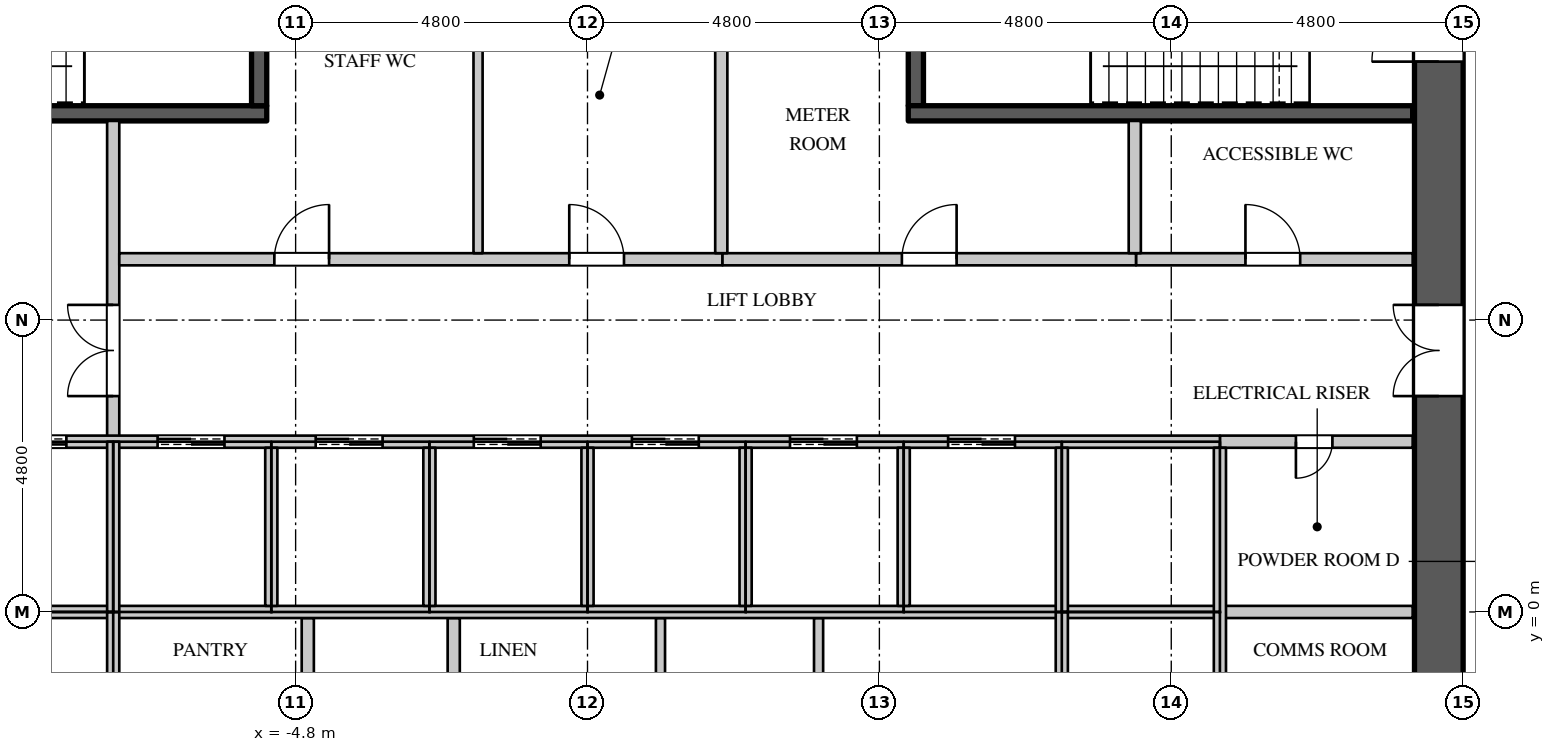
"""IFC4 building model, lengths in metres.
Left out: names, types, materials, properties, quantities, classifications, styles, units other than length and angle.
Written with IfcOpenShell. Run it as: python <this file> out.ifc"""

import sys

from ifc_helpers import new_model, si_unit, direction, frame, frame_2d, origin, place, context, subcontext, project, spatial, rectangle, extrude, element, fill, save


model = new_model("IFC4")
c1 = context("Model", 3, precision=1e-05, world=origin(), true_north=direction((0.0, 1.0)))
c2 = subcontext(c1, "Body", "Model", "MODEL_VIEW")
j1 = project(units=[si_unit("LENGTHUNIT", "METRE"), si_unit("PLANEANGLEUNIT", "RADIAN")], contexts=[c1])
p1 = place(None, origin())
s1 = spatial("IfcSite", under=j1, at=p1, CompositionType="ELEMENT")
p2 = place(p1, origin())
s2 = spatial("IfcBuilding", under=s1, at=p2, CompositionType="ELEMENT")
p3 = place(p2, frame((0.0, 0.0, 106.5)))
s3 = spatial("IfcBuildingStorey", under=s2, at=p3, CompositionType="ELEMENT", Elevation=106.5)
p4 = place(p3, frame((14.0, -11.2, 0.0), z_axis=(0.0, 0.0, 1.0), x_axis=(0.0, 1.0, 0.0)))
e1 = element("IfcWall", 1, at=p4, inside=s3, PredefinedType="SHEAR", context=c2, shape_type="SweptSolid", body=[
    extrude(rectangle(XDim=22.4, YDim=0.8, at=frame_2d((11.2, 0.0))), origin(), (0.0, 0.0, 1.0), 4.2),
])
p5 = place(p4, frame((20.25, 0.0, 0.0)))
e2 = element("IfcOpeningElement", 2, at=p5, cuts=e1, PredefinedType="OPENING", context=c2, shape_type="SweptSolid", body=[
    extrude(rectangle(XDim=1.1, YDim=2.2, at=frame_2d((0.55, 1.1))), frame((0.0, 0.41, 0.0), z_axis=(0.0, -1.0, 0.0), x_axis=(1.0, 0.0, 0.0)), (0.0, 0.0, 1.0), 0.82),
])
p6 = place(p4, frame((1.05, 0.0, 0.0)))
e3 = element("IfcOpeningElement", 3, at=p6, cuts=e1, PredefinedType="OPENING", context=c2, shape_type="SweptSolid", body=[
    extrude(rectangle(XDim=1.1, YDim=2.2, at=frame_2d((0.55, 1.1))), frame((0.0, 0.41, 0.0), z_axis=(0.0, -1.0, 0.0), x_axis=(1.0, 0.0, 0.0)), (0.0, 0.0, 1.0), 0.82),
])
p7 = place(p4, frame((14.75, 0.0, 0.0)))
e4 = element("IfcOpeningElement", 4, at=p7, cuts=e1, PredefinedType="OPENING", context=c2, shape_type="SweptSolid", body=[
    extrude(rectangle(XDim=1.5, YDim=2.4, at=frame_2d((0.75, 1.2))), frame((0.0, 0.41, 0.0), z_axis=(0.0, -1.0, 0.0), x_axis=(1.0, 0.0, 0.0)), (0.0, 0.0, 1.0), 0.82),
])
p8 = place(p4, frame((6.15, 0.0, 0.0)))
e5 = element("IfcOpeningElement", 5, at=p8, cuts=e1, PredefinedType="OPENING", context=c2, shape_type="SweptSolid", body=[
    extrude(rectangle(XDim=1.5, YDim=2.4, at=frame_2d((0.75, 1.2))), frame((0.0, 0.41, 0.0), z_axis=(0.0, -1.0, 0.0), x_axis=(1.0, 0.0, 0.0)), (0.0, 0.0, 1.0), 0.82),
])
p9 = place(p3, frame((-7.8, 2.8, 0.0), z_axis=(0.0, 0.0, 1.0), x_axis=(0.0, 1.0, 0.0)))
e6 = element("IfcWall", 6, at=p9, inside=s3, PredefinedType="PARTITIONING", context=c2, shape_type="SweptSolid", body=[
    extrude(rectangle(XDim=5.275, YDim=0.2, at=frame_2d((2.637, 0.0))), origin(), (0.0, 0.0, 1.0), 3.95),
])
p10 = place(p9, frame((0.75, 0.0, 0.0)))
e7 = element("IfcOpeningElement", 7, at=p10, cuts=e6, PredefinedType="OPENING", context=c2, shape_type="SweptSolid", body=[
    extrude(rectangle(XDim=1.5, YDim=2.4, at=frame_2d((0.75, 1.2))), frame((0.0, 0.11, 0.0), z_axis=(0.0, -1.0, 0.0), x_axis=(1.0, 0.0, 0.0)), (0.0, 0.0, 1.0), 0.22),
])
p11 = place(p3, frame((-7.7, 5.8, 0.0), z_axis=(0.0, 0.0, 1.0), x_axis=(1.0, 0.0, 0.0)))
e8 = element("IfcWall", 8, at=p11, inside=s3, PredefinedType="PARTITIONING", context=c2, shape_type="SweptSolid", body=[
    extrude(rectangle(XDim=9.92, YDim=0.2, at=frame_2d((4.96, 0.0))), origin(), (0.0, 0.0, 1.0), 3.95),
])
p12 = place(p11, frame((2.55, 0.0, 0.0)))
e9 = element("IfcOpeningElement", 9, at=p12, cuts=e8, PredefinedType="OPENING", context=c2, shape_type="SweptSolid", body=[
    extrude(rectangle(XDim=0.9, YDim=2.2, at=frame_2d((0.45, 1.1))), frame((0.0, 0.11, 0.0), z_axis=(0.0, -1.0, 0.0), x_axis=(1.0, 0.0, 0.0)), (0.0, 0.0, 1.0), 0.22),
])
p13 = place(p11, frame((7.4, 0.0, 0.0)))
e10 = element("IfcOpeningElement", 10, at=p13, cuts=e8, PredefinedType="OPENING", context=c2, shape_type="SweptSolid", body=[
    extrude(rectangle(XDim=0.9, YDim=2.2, at=frame_2d((0.45, 1.1))), frame((0.0, 0.11, 0.0), z_axis=(0.0, -1.0, 0.0), x_axis=(1.0, 0.0, 0.0)), (0.0, 0.0, 1.0), 0.22),
])
p14 = place(p3, frame((9.02, 5.8, 0.0), z_axis=(0.0, 0.0, 1.0), x_axis=(1.0, 0.0, 0.0)))
e11 = element("IfcWall", 11, at=p14, inside=s3, PredefinedType="PARTITIONING", context=c2, shape_type="SweptSolid", body=[
    extrude(rectangle(XDim=4.55, YDim=0.2, at=frame_2d((2.275, 0.0))), origin(), (0.0, 0.0, 1.0), 3.95),
])
p15 = place(p14, frame((1.8, 0.0, 0.0)))
e12 = element("IfcOpeningElement", 12, at=p15, cuts=e11, PredefinedType="OPENING", context=c2, shape_type="SweptSolid", body=[
    extrude(rectangle(XDim=0.9, YDim=2.2, at=frame_2d((0.45, 1.1))), frame((0.0, 0.11, 0.0), z_axis=(0.0, -1.0, 0.0), x_axis=(1.0, 0.0, 0.0)), (0.0, 0.0, 1.0), 0.22),
])
p16 = place(p3, frame((-1.8, 5.9, 0.0), z_axis=(0.0, 0.0, 1.0), x_axis=(0.0, 1.0, 0.0)))
e13 = element("IfcWall", 13, at=p16, inside=s3, PredefinedType="PARTITIONING", context=c2, shape_type="SweptSolid", body=[
    extrude(rectangle(XDim=5.27, YDim=0.15, at=frame_2d((2.635, 0.0))), origin(), (0.0, 0.0, 1.0), 3.95),
])
for number, where, z_axis, x_axis in (
    (14, (1.2, -2.7, 0.0), (0.0, 0.0, 1.0), (0.0, 1.0, 0.0)),
    (15, (3.8, -2.7, 0.0), (0.0, 0.0, 1.0), (0.0, 1.0, 0.0)),
):
    element("IfcWall", number, at=place(p3, frame(where, z_axis=z_axis, x_axis=x_axis)), inside=s3, PredefinedType="PARTITIONING", context=c2, shape_type="SweptSolid", body=[
        extrude(rectangle(XDim=2.6, YDim=0.15, at=frame_2d((1.3, 0.0))), origin(), (0.0, 0.0, 1.0), 3.95),
    ])
for number, where, z_axis, x_axis in (
    (16, (-4.6, -2.7, 0.0), (0.0, 0.0, 1.0), (0.0, 1.0, 0.0)),
    (17, (-2.2, -2.7, 0.0), (0.0, 0.0, 1.0), (0.0, 1.0, 0.0)),
):
    element("IfcWall", number, at=place(p3, frame(where, z_axis=z_axis, x_axis=x_axis)), inside=s3, PredefinedType="PARTITIONING", context=c2, shape_type="SweptSolid", body=[
        extrude(rectangle(XDim=2.6, YDim=0.2, at=frame_2d((1.3, 0.0))), origin(), (0.0, 0.0, 1.0), 3.95),
    ])
p17 = place(p3, frame((2.22, 5.8, 0.0), z_axis=(0.0, 0.0, 1.0), x_axis=(1.0, 0.0, 0.0)))
e18 = element("IfcWall", 18, at=p17, inside=s3, PredefinedType="PARTITIONING", context=c2, shape_type="SweptSolid", body=[
    extrude(rectangle(XDim=6.8, YDim=0.2, at=frame_2d((3.4, 0.0))), origin(), (0.0, 0.0, 1.0), 3.95),
])
p18 = place(p17, frame((2.95, 0.0, 0.0)))
e19 = element("IfcOpeningElement", 19, at=p18, cuts=e18, PredefinedType="OPENING", context=c2, shape_type="SweptSolid", body=[
    extrude(rectangle(XDim=0.9, YDim=2.2, at=frame_2d((0.45, 1.1))), frame((0.0, 0.11, 0.0), z_axis=(0.0, -1.0, 0.0), x_axis=(1.0, 0.0, 0.0)), (0.0, 0.0, 1.0), 0.22),
])
p19 = place(p3, frame((2.2, 5.9, 0.0), z_axis=(0.0, 0.0, 1.0), x_axis=(0.0, 1.0, 0.0)))
e20 = element("IfcWall", 20, at=p19, inside=s3, PredefinedType="PARTITIONING", context=c2, shape_type="SweptSolid", body=[
    extrude(rectangle(XDim=5.27, YDim=0.2, at=frame_2d((2.635, 0.0))), origin(), (0.0, 0.0, 1.0), 3.95),
])
p20 = place(p3, frame((9.0, 5.9, 0.0), z_axis=(0.0, 0.0, 1.0), x_axis=(0.0, 1.0, 0.0)))
e21 = element("IfcWall", 21, at=p20, inside=s3, PredefinedType="PARTITIONING", context=c2, shape_type="SweptSolid", body=[
    extrude(rectangle(XDim=2.175, YDim=0.2, at=frame_2d((1.087, 0.0))), origin(), (0.0, 0.0, 1.0), 3.95),
])
p21 = place(p3, frame((10.4, 2.8, 0.0), z_axis=(0.0, 0.0, 1.0), x_axis=(1.0, 0.0, 0.0)))
e22 = element("IfcWall", 22, at=p21, inside=s3, PredefinedType="PARTITIONING", context=c2, shape_type="SweptSolid", body=[
    extrude(rectangle(XDim=3.17, YDim=0.2, at=frame_2d((1.585, 0.0))), origin(), (0.0, 0.0, 1.0), 3.95),
])
p22 = place(p21, frame((1.25, 0.0, 0.0)))
e23 = element("IfcOpeningElement", 23, at=p22, cuts=e22, PredefinedType="OPENING", context=c2, shape_type="SweptSolid", body=[
    extrude(rectangle(XDim=0.6, YDim=2.0, at=frame_2d((0.3, 1.0))), frame((0.0, 0.11, 0.0), z_axis=(0.0, -1.0, 0.0), x_axis=(1.0, 0.0, 0.0)), (0.0, 0.0, 1.0), 0.22),
])
p23 = place(p3, frame((10.4, 0.0, 0.0), z_axis=(0.0, 0.0, 1.0), x_axis=(1.0, 0.0, 0.0)))
e24 = element("IfcWall", 24, at=p23, inside=s3, PredefinedType="PARTITIONING", context=c2, shape_type="SweptSolid", body=[
    extrude(rectangle(XDim=3.17, YDim=0.2, at=frame_2d((1.585, 0.0))), origin(), (0.0, 0.0, 1.0), 3.95),
])
p24 = place(p3, frame((-13.57, 0.0, 0.0), z_axis=(0.0, 0.0, 1.0), x_axis=(1.0, 0.0, 0.0)))
e25 = element("IfcWall", 25, at=p24, inside=s3, PredefinedType="PARTITIONING", context=c2, shape_type="SweptSolid", body=[
    extrude(rectangle(XDim=23.97, YDim=0.2, at=frame_2d((11.985, 0.0))), origin(), (0.0, 0.0, 1.0), 3.95),
])
p25 = place(p3, frame((-13.57, 2.8, 0.0), z_axis=(0.0, 0.0, 1.0), x_axis=(1.0, 0.0, 0.0)))
e26 = element("IfcWall", 26, at=p25, inside=s3, PredefinedType="PARTITIONING", context=c2, shape_type="SweptSolid", body=[
    extrude(rectangle(XDim=23.97, YDim=0.2, at=frame_2d((11.985, 0.0))), origin(), (0.0, 0.0, 1.0), 3.95),
])
p26 = place(p25, frame((1.0, 0.0, 0.0)))
e27 = element("IfcOpeningElement", 27, at=p26, cuts=e26, PredefinedType="OPENING", context=c2, shape_type="SweptSolid", body=[
    extrude(rectangle(XDim=1.1, YDim=2.2, at=frame_2d((0.55, 1.1))), frame((0.0, 0.11, 0.0), z_axis=(0.0, -1.0, 0.0), x_axis=(1.0, 0.0, 0.0)), (0.0, 0.0, 1.0), 0.22),
])
p27 = place(p25, frame((3.9, 0.0, 0.0)))
e28 = element("IfcOpeningElement", 28, at=p27, cuts=e26, PredefinedType="OPENING", context=c2, shape_type="SweptSolid", body=[
    extrude(rectangle(XDim=1.1, YDim=2.2, at=frame_2d((0.55, 1.1))), frame((0.0, 0.11, 0.0), z_axis=(0.0, -1.0, 0.0), x_axis=(1.0, 0.0, 0.0)), (0.0, 0.0, 1.0), 0.22),
])
p28 = place(p25, frame((6.5, 0.0, 0.0)))
e29 = element("IfcOpeningElement", 29, at=p28, cuts=e26, PredefinedType="OPENING", context=c2, shape_type="SweptSolid", body=[
    extrude(rectangle(XDim=1.1, YDim=2.2, at=frame_2d((0.55, 1.1))), frame((0.0, 0.11, 0.0), z_axis=(0.0, -1.0, 0.0), x_axis=(1.0, 0.0, 0.0)), (0.0, 0.0, 1.0), 0.22),
])
p29 = place(p25, frame((9.1, 0.0, 0.0)))
e30 = element("IfcOpeningElement", 30, at=p29, cuts=e26, PredefinedType="OPENING", context=c2, shape_type="SweptSolid", body=[
    extrude(rectangle(XDim=1.1, YDim=2.2, at=frame_2d((0.55, 1.1))), frame((0.0, 0.11, 0.0), z_axis=(0.0, -1.0, 0.0), x_axis=(1.0, 0.0, 0.0)), (0.0, 0.0, 1.0), 0.22),
])
p30 = place(p25, frame((11.7, 0.0, 0.0)))
e31 = element("IfcOpeningElement", 31, at=p30, cuts=e26, PredefinedType="OPENING", context=c2, shape_type="SweptSolid", body=[
    extrude(rectangle(XDim=1.1, YDim=2.2, at=frame_2d((0.55, 1.1))), frame((0.0, 0.11, 0.0), z_axis=(0.0, -1.0, 0.0), x_axis=(1.0, 0.0, 0.0)), (0.0, 0.0, 1.0), 0.22),
])
p31 = place(p25, frame((14.3, 0.0, 0.0)))
e32 = element("IfcOpeningElement", 32, at=p31, cuts=e26, PredefinedType="OPENING", context=c2, shape_type="SweptSolid", body=[
    extrude(rectangle(XDim=1.1, YDim=2.2, at=frame_2d((0.55, 1.1))), frame((0.0, 0.11, 0.0), z_axis=(0.0, -1.0, 0.0), x_axis=(1.0, 0.0, 0.0)), (0.0, 0.0, 1.0), 0.22),
])
p32 = place(p25, frame((16.9, 0.0, 0.0)))
e33 = element("IfcOpeningElement", 33, at=p32, cuts=e26, PredefinedType="OPENING", context=c2, shape_type="SweptSolid", body=[
    extrude(rectangle(XDim=1.1, YDim=2.2, at=frame_2d((0.55, 1.1))), frame((0.0, 0.11, 0.0), z_axis=(0.0, -1.0, 0.0), x_axis=(1.0, 0.0, 0.0)), (0.0, 0.0, 1.0), 0.22),
])
p33 = place(p25, frame((19.5, 0.0, 0.0)))
e34 = element("IfcOpeningElement", 34, at=p33, cuts=e26, PredefinedType="OPENING", context=c2, shape_type="SweptSolid", body=[
    extrude(rectangle(XDim=1.1, YDim=2.2, at=frame_2d((0.55, 1.1))), frame((0.0, 0.11, 0.0), z_axis=(0.0, -1.0, 0.0), x_axis=(1.0, 0.0, 0.0)), (0.0, 0.0, 1.0), 0.22),
])
for number, where, z_axis, x_axis in (
    (35, (-7.8, -2.8, 0.0), (0.0, 0.0, 1.0), (0.0, 1.0, 0.0)),
    (36, (-7.8, 0.0, 0.0), (0.0, 0.0, 1.0), (0.0, 1.0, 0.0)),
):
    element("IfcWall", number, at=place(p3, frame(where, z_axis=z_axis, x_axis=x_axis)), inside=s3, PredefinedType="PARTITIONING", context=c2, shape_type="SweptSolid", body=[
        extrude(rectangle(XDim=2.8, YDim=0.2, at=frame_2d((1.4, 0.0))), origin(), (0.0, 0.0, 1.0), 3.95),
    ])
for number, where, z_axis, x_axis in (
    (37, (-5.2, 0.1, 0.0), (0.0, 0.0, 1.0), (0.0, 1.0, 0.0)),
    (38, (-2.6, 0.1, 0.0), (0.0, 0.0, 1.0), (0.0, 1.0, 0.0)),
    (39, (0.0, 0.1, 0.0), (0.0, 0.0, 1.0), (0.0, 1.0, 0.0)),
    (40, (2.6, 0.1, 0.0), (0.0, 0.0, 1.0), (0.0, 1.0, 0.0)),
    (41, (5.2, 0.1, 0.0), (0.0, 0.0, 1.0), (0.0, 1.0, 0.0)),
):
    element("IfcWall", number, at=place(p3, frame(where, z_axis=z_axis, x_axis=x_axis)), inside=s3, PredefinedType="PARTITIONING", context=c2, shape_type="SweptSolid", body=[
        extrude(rectangle(XDim=2.6, YDim=0.2, at=frame_2d((1.3, 0.0))), origin(), (0.0, 0.0, 1.0), 3.95),
    ])
for number, where, z_axis, x_axis in (
    (42, (7.8, -2.7, 0.0), (0.0, 0.0, 1.0), (0.0, 1.0, 0.0)),
    (43, (7.8, 0.0, 0.0), (0.0, 0.0, 1.0), (0.0, 1.0, 0.0)),
):
    element("IfcWall", number, at=place(p3, frame(where, z_axis=z_axis, x_axis=x_axis)), inside=s3, PredefinedType="PARTITIONING", context=c2, shape_type="SweptSolid", body=[
        extrude(rectangle(XDim=2.7, YDim=0.2, at=frame_2d((1.35, 0.0))), origin(), (0.0, 0.0, 1.0), 3.95),
    ])
p34 = place(p3, frame((10.4, -2.7, 0.0), z_axis=(0.0, 0.0, 1.0), x_axis=(0.0, 1.0, 0.0)))
e44 = element("IfcWall", 44, at=p34, inside=s3, PredefinedType="PARTITIONING", context=c2, shape_type="SweptSolid", body=[
    extrude(rectangle(XDim=5.4, YDim=0.2, at=frame_2d((2.7, 0.0))), origin(), (0.0, 0.0, 1.0), 3.95),
])
p35 = place(p3, frame((-13.57, 8.2, 0.0), z_axis=(0.0, 0.0, 1.0), x_axis=(1.0, 0.0, 0.0)))
e45 = element("IfcWall", 45, at=p35, inside=s3, PredefinedType="SHEAR", context=c2, shape_type="SweptSolid", body=[
    extrude(rectangle(XDim=8.295, YDim=0.25, at=frame_2d((4.147, 0.0))), origin(), (0.0, 0.0, 1.0), 3.95),
])
p36 = place(p35, frame((0.15, 0.0, 0.0)))
e46 = element("IfcOpeningElement", 46, at=p36, cuts=e45, PredefinedType="OPENING", context=c2, shape_type="SweptSolid", body=[
    extrude(rectangle(XDim=1.1, YDim=2.2, at=frame_2d((0.55, 1.1))), frame((0.0, 0.135, 0.0), z_axis=(0.0, -1.0, 0.0), x_axis=(1.0, 0.0, 0.0)), (0.0, 0.0, 1.0), 0.27),
])
for number, where, z_axis, x_axis in (
    (47, (-5.4, 8.325, 0.0), (0.0, 0.0, 1.0), (0.0, 1.0, 0.0)),
    (48, (5.4, 8.325, 0.0), (0.0, 0.0, 1.0), (0.0, 1.0, 0.0)),
):
    element("IfcWall", number, at=place(p3, frame(where, z_axis=z_axis, x_axis=x_axis)), inside=s3, PredefinedType="SHEAR", context=c2, shape_type="SweptSolid", body=[
        extrude(rectangle(XDim=2.845, YDim=0.25, at=frame_2d((1.422, 0.0))), origin(), (0.0, 0.0, 1.0), 3.95),
    ])
p37 = place(p3, frame((5.275, 8.2, 0.0), z_axis=(0.0, 0.0, 1.0), x_axis=(1.0, 0.0, 0.0)))
e49 = element("IfcWall", 49, at=p37, inside=s3, PredefinedType="SHEAR", context=c2, shape_type="SweptSolid", body=[
    extrude(rectangle(XDim=8.295, YDim=0.25, at=frame_2d((4.147, 0.0))), origin(), (0.0, 0.0, 1.0), 3.95),
])
p38 = place(p22, origin())
e50 = element("IfcDoor", 50, at=p38, inside=s3, OperationType="SINGLE_SWING_RIGHT", PredefinedType="DOOR", context=c2, shape_type="SweptSolid", body=[
    extrude(rectangle(XDim=0.6, YDim=2.0, at=frame_2d((0.3, 1.0))), frame((0.0, 0.025, 0.0), z_axis=(0.0, -1.0, 0.0), x_axis=(1.0, 0.0, 0.0)), (0.0, 0.0, 1.0), 0.05),
])
fill(e23, e50)
p39 = place(p12, origin())
e51 = element("IfcDoor", 51, at=p39, inside=s3, OperationType="SINGLE_SWING_RIGHT", PredefinedType="DOOR", context=c2, shape_type="SweptSolid", body=[
    extrude(rectangle(XDim=0.9, YDim=2.2, at=frame_2d((0.45, 1.1))), frame((0.0, 0.025, 0.0), z_axis=(0.0, -1.0, 0.0), x_axis=(1.0, 0.0, 0.0)), (0.0, 0.0, 1.0), 0.05),
])
fill(e9, e51)
p40 = place(p13, origin())
e52 = element("IfcDoor", 52, at=p40, inside=s3, OperationType="SINGLE_SWING_LEFT", PredefinedType="DOOR", context=c2, shape_type="SweptSolid", body=[
    extrude(rectangle(XDim=0.9, YDim=2.2, at=frame_2d((0.45, 1.1))), frame((0.0, 0.025, 0.0), z_axis=(0.0, -1.0, 0.0), x_axis=(1.0, 0.0, 0.0)), (0.0, 0.0, 1.0), 0.05),
])
fill(e10, e52)
p41 = place(p18, origin())
e53 = element("IfcDoor", 53, at=p41, inside=s3, OperationType="SINGLE_SWING_RIGHT", PredefinedType="DOOR", context=c2, shape_type="SweptSolid", body=[
    extrude(rectangle(XDim=0.9, YDim=2.2, at=frame_2d((0.45, 1.1))), frame((0.0, 0.025, 0.0), z_axis=(0.0, -1.0, 0.0), x_axis=(1.0, 0.0, 0.0)), (0.0, 0.0, 1.0), 0.05),
])
fill(e19, e53)
p42 = place(p15, origin())
e54 = element("IfcDoor", 54, at=p42, inside=s3, OperationType="SINGLE_SWING_LEFT", PredefinedType="DOOR", context=c2, shape_type="SweptSolid", body=[
    extrude(rectangle(XDim=0.9, YDim=2.2, at=frame_2d((0.45, 1.1))), frame((0.0, 0.025, 0.0), z_axis=(0.0, -1.0, 0.0), x_axis=(1.0, 0.0, 0.0)), (0.0, 0.0, 1.0), 0.05),
])
fill(e12, e54)
p43 = place(p27, origin())
e55 = element("IfcDoor", 55, at=p43, inside=s3, OperationType="DOUBLE_DOOR_SLIDING", PredefinedType="DOOR", context=c2, shape_type="SweptSolid", body=[
    extrude(rectangle(XDim=1.1, YDim=2.2, at=frame_2d((0.55, 1.1))), frame((0.0, 0.025, 0.0), z_axis=(0.0, -1.0, 0.0), x_axis=(1.0, 0.0, 0.0)), (0.0, 0.0, 1.0), 0.05),
])
fill(e28, e55)
p44 = place(p28, origin())
e56 = element("IfcDoor", 56, at=p44, inside=s3, OperationType="DOUBLE_DOOR_SLIDING", PredefinedType="DOOR", context=c2, shape_type="SweptSolid", body=[
    extrude(rectangle(XDim=1.1, YDim=2.2, at=frame_2d((0.55, 1.1))), frame((0.0, 0.025, 0.0), z_axis=(0.0, -1.0, 0.0), x_axis=(1.0, 0.0, 0.0)), (0.0, 0.0, 1.0), 0.05),
])
fill(e29, e56)
p45 = place(p29, origin())
e57 = element("IfcDoor", 57, at=p45, inside=s3, OperationType="DOUBLE_DOOR_SLIDING", PredefinedType="DOOR", context=c2, shape_type="SweptSolid", body=[
    extrude(rectangle(XDim=1.1, YDim=2.2, at=frame_2d((0.55, 1.1))), frame((0.0, 0.025, 0.0), z_axis=(0.0, -1.0, 0.0), x_axis=(1.0, 0.0, 0.0)), (0.0, 0.0, 1.0), 0.05),
])
fill(e30, e57)
p46 = place(p30, origin())
e58 = element("IfcDoor", 58, at=p46, inside=s3, OperationType="DOUBLE_DOOR_SLIDING", PredefinedType="DOOR", context=c2, shape_type="SweptSolid", body=[
    extrude(rectangle(XDim=1.1, YDim=2.2, at=frame_2d((0.55, 1.1))), frame((0.0, 0.025, 0.0), z_axis=(0.0, -1.0, 0.0), x_axis=(1.0, 0.0, 0.0)), (0.0, 0.0, 1.0), 0.05),
])
fill(e31, e58)
p47 = place(p31, origin())
e59 = element("IfcDoor", 59, at=p47, inside=s3, OperationType="DOUBLE_DOOR_SLIDING", PredefinedType="DOOR", context=c2, shape_type="SweptSolid", body=[
    extrude(rectangle(XDim=1.1, YDim=2.2, at=frame_2d((0.55, 1.1))), frame((0.0, 0.025, 0.0), z_axis=(0.0, -1.0, 0.0), x_axis=(1.0, 0.0, 0.0)), (0.0, 0.0, 1.0), 0.05),
])
fill(e32, e59)
p48 = place(p32, origin())
e60 = element("IfcDoor", 60, at=p48, inside=s3, OperationType="DOUBLE_DOOR_SLIDING", PredefinedType="DOOR", context=c2, shape_type="SweptSolid", body=[
    extrude(rectangle(XDim=1.1, YDim=2.2, at=frame_2d((0.55, 1.1))), frame((0.0, 0.025, 0.0), z_axis=(0.0, -1.0, 0.0), x_axis=(1.0, 0.0, 0.0)), (0.0, 0.0, 1.0), 0.05),
])
fill(e33, e60)
p49 = place(p33, origin())
e61 = element("IfcDoor", 61, at=p49, inside=s3, OperationType="DOUBLE_DOOR_SLIDING", PredefinedType="DOOR", context=c2, shape_type="SweptSolid", body=[
    extrude(rectangle(XDim=1.1, YDim=2.2, at=frame_2d((0.55, 1.1))), frame((0.0, 0.025, 0.0), z_axis=(0.0, -1.0, 0.0), x_axis=(1.0, 0.0, 0.0)), (0.0, 0.0, 1.0), 0.05),
])
fill(e34, e61)
p50 = place(p10, origin())
e62 = element("IfcDoor", 62, at=p50, inside=s3, OperationType="DOUBLE_DOOR_SINGLE_SWING", PredefinedType="DOOR", context=c2, shape_type="SweptSolid", body=[
    extrude(rectangle(XDim=1.5, YDim=2.4, at=frame_2d((0.75, 1.2))), frame((0.0, 0.025, 0.0), z_axis=(0.0, -1.0, 0.0), x_axis=(1.0, 0.0, 0.0)), (0.0, 0.0, 1.0), 0.05),
])
fill(e7, e62)
p51 = place(p5, origin())
e63 = element("IfcDoor", 63, at=p51, inside=s3, OperationType="SINGLE_SWING_LEFT", PredefinedType="DOOR", context=c2, shape_type="SweptSolid", body=[
    extrude(rectangle(XDim=1.1, YDim=2.2, at=frame_2d((0.55, 1.1))), frame((0.0, 0.395, 0.0), z_axis=(0.0, -1.0, 0.0), x_axis=(1.0, 0.0, 0.0)), (0.0, 0.0, 1.0), 0.05),
])
fill(e2, e63)
p52 = place(p7, origin())
e64 = element("IfcDoor", 64, at=p52, inside=s3, OperationType="DOUBLE_DOOR_SINGLE_SWING", PredefinedType="DOOR", context=c2, shape_type="SweptSolid", body=[
    extrude(rectangle(XDim=1.5, YDim=2.4, at=frame_2d((0.75, 1.2))), frame((0.0, 0.395, 0.0), z_axis=(0.0, -1.0, 0.0), x_axis=(1.0, 0.0, 0.0)), (0.0, 0.0, 1.0), 0.05),
])
fill(e4, e64)
save(model, sys.argv[1])
